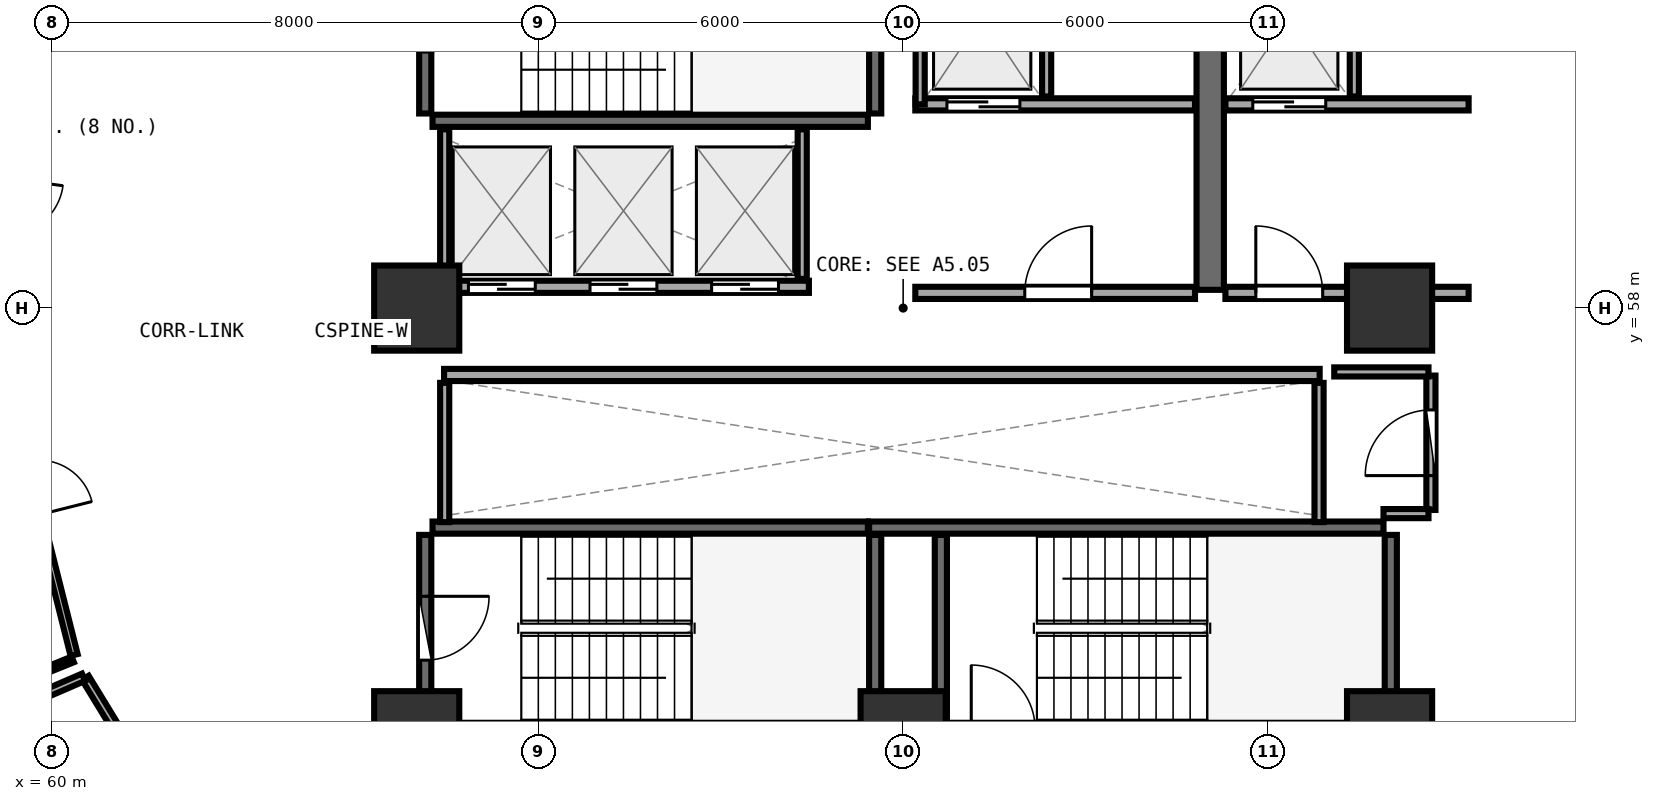
"""IFC4 building model, lengths in metres.
Left out: names, types, materials, properties, quantities, classifications, styles, units other than length and angle.
Written with IfcOpenShell. Run it as: python <this file> out.ifc"""

import sys

from ifc_helpers import new_model, si_unit, direction, frame, frame_2d, origin, origin_2d, place, context, subcontext, project, spatial, rectangle, extrude, element, fill, save


model = new_model("IFC4")
c1 = context("Model", 3, precision=1e-05, world=origin(), true_north=direction((0.0, 1.0)))
c2 = subcontext(c1, "Body", "Model", "MODEL_VIEW")
j1 = project(units=[si_unit("LENGTHUNIT", "METRE"), si_unit("PLANEANGLEUNIT", "RADIAN")], contexts=[c1])
p1 = place(None, origin())
s1 = spatial("IfcSite", under=j1, at=p1, CompositionType="ELEMENT")
p2 = place(p1, origin())
s2 = spatial("IfcBuilding", under=s1, at=p2, CompositionType="ELEMENT")
p3 = place(p2, frame((0.0, 0.0, 22.5)))
s3 = spatial("IfcBuildingStorey", under=s2, at=p3, CompositionType="ELEMENT", Elevation=22.5)
for number, where, z_axis, x_axis in (
    (1, (66.0, 51.0, 0.0), (0.0, 0.0, 1.0), (1.0, 0.0, 0.0)),
    (2, (74.0, 51.0, 0.0), (0.0, 0.0, 1.0), (1.0, 0.0, 0.0)),
    (3, (82.0, 51.0, 0.0), (0.0, 0.0, 1.0), (1.0, 0.0, 0.0)),
    (4, (82.0, 58.0, 0.0), (0.0, 0.0, 1.0), (1.0, 0.0, 0.0)),
    (5, (66.0, 58.0, 0.0), (0.0, 0.0, 1.0), (1.0, 0.0, 0.0)),
):
    element("IfcColumn", number, at=place(p3, frame(where, z_axis=z_axis, x_axis=x_axis)), inside=s3, PredefinedType="PILASTER", context=c2, shape_type="SweptSolid", body=[
        extrude(rectangle(XDim=1.4, YDim=1.4, at=origin_2d()), origin(), (0.0, 0.0, 1.0), 3.75),
    ])
p4 = place(p3, frame((66.26, 61.08, 0.0), z_axis=(0.0, 0.0, 1.0), x_axis=(1.0, 0.0, 0.0)))
e6 = element("IfcWall", 6, at=p4, inside=s3, PredefinedType="SHEAR", context=c2, shape_type="SweptSolid", body=[
    extrude(rectangle(XDim=7.16, YDim=0.2, at=frame_2d((3.58, 0.0))), origin(), (0.0, 0.0, 1.0), 3.49),
])
p5 = place(p3, frame((73.54, 61.2, 0.0), z_axis=(0.0, 0.0, 1.0), x_axis=(0.0, 1.0, 0.0)))
e7 = element("IfcWall", 7, at=p5, inside=s3, PredefinedType="SHEAR", context=c2, shape_type="SweptSolid", body=[
    extrude(rectangle(XDim=3.07, YDim=0.2, at=frame_2d((1.535, 0.0))), origin(), (0.0, 0.0, 1.0), 3.49),
])
p6 = place(p3, frame((66.14, 64.27, 0.0), z_axis=(0.0, 0.0, 1.0), x_axis=(0.0, -1.0, 0.0)))
e8 = element("IfcWall", 8, at=p6, inside=s3, PredefinedType="SHEAR", context=c2, shape_type="SweptSolid", body=[
    extrude(rectangle(XDim=3.07, YDim=0.2, at=frame_2d((1.535, 0.0))), origin(), (0.0, 0.0, 1.0), 3.49),
])
p7 = place(p6, frame((1.01, 0.0, 0.0)))
e9 = element("IfcOpeningElement", 9, at=p7, cuts=e8, PredefinedType="OPENING", context=c2, shape_type="SweptSolid", body=[
    extrude(rectangle(XDim=1.05, YDim=2.1, at=frame_2d((0.525, 1.05))), frame((0.0, 0.11, 0.0), z_axis=(0.0, -1.0, 0.0), x_axis=(1.0, 0.0, 0.0)), (0.0, 0.0, 1.0), 0.22),
])
p8 = place(p3, frame((82.02, 51.2, 0.0), z_axis=(0.0, 0.0, 1.0), x_axis=(0.0, 1.0, 0.0)))
e10 = element("IfcWall", 10, at=p8, inside=s3, PredefinedType="SHEAR", context=c2, shape_type="SweptSolid", body=[
    extrude(rectangle(XDim=3.07, YDim=0.2, at=frame_2d((1.535, 0.0))), origin(), (0.0, 0.0, 1.0), 3.49),
])
p9 = place(p3, frame((81.9, 54.39, 0.0), z_axis=(0.0, 0.0, 1.0), x_axis=(-1.0, 0.0, 0.0)))
e11 = element("IfcWall", 11, at=p9, inside=s3, PredefinedType="SHEAR", context=c2, shape_type="SweptSolid", body=[
    extrude(rectangle(XDim=8.46, YDim=0.2, at=frame_2d((4.23, 0.0))), origin(), (0.0, 0.0, 1.0), 3.49),
])
for number, where, z_axis, x_axis in (
    (12, (74.62, 54.27, 0.0), (0.0, 0.0, 1.0), (0.0, -1.0, 0.0)),
    (13, (73.54, 51.2, 0.0), (0.0, 0.0, 1.0), (0.0, 1.0, 0.0)),
):
    element("IfcWall", number, at=place(p3, frame(where, z_axis=z_axis, x_axis=x_axis)), inside=s3, PredefinedType="SHEAR", context=c2, shape_type="SweptSolid", body=[
        extrude(rectangle(XDim=3.07, YDim=0.2, at=frame_2d((1.535, 0.0))), origin(), (0.0, 0.0, 1.0), 3.49),
    ])
p10 = place(p3, frame((73.42, 54.39, 0.0), z_axis=(0.0, 0.0, 1.0), x_axis=(-1.0, 0.0, 0.0)))
e14 = element("IfcWall", 14, at=p10, inside=s3, PredefinedType="SHEAR", context=c2, shape_type="SweptSolid", body=[
    extrude(rectangle(XDim=7.16, YDim=0.2, at=frame_2d((3.58, 0.0))), origin(), (0.0, 0.0, 1.0), 3.49),
])
p11 = place(p3, frame((66.14, 54.27, 0.0), z_axis=(0.0, 0.0, 1.0), x_axis=(0.0, -1.0, 0.0)))
e15 = element("IfcWall", 15, at=p11, inside=s3, PredefinedType="SHEAR", context=c2, shape_type="SweptSolid", body=[
    extrude(rectangle(XDim=3.07, YDim=0.2, at=frame_2d((1.535, 0.0))), origin(), (0.0, 0.0, 1.0), 3.49),
])
p12 = place(p11, frame((1.01, 0.0, 0.0)))
e16 = element("IfcOpeningElement", 16, at=p12, cuts=e15, PredefinedType="OPENING", context=c2, shape_type="SweptSolid", body=[
    extrude(rectangle(XDim=1.05, YDim=2.1, at=frame_2d((0.525, 1.05))), frame((0.0, 0.11, 0.0), z_axis=(0.0, -1.0, 0.0), x_axis=(1.0, 0.0, 0.0)), (0.0, 0.0, 1.0), 0.22),
])
p13 = place(p3, frame((79.05, 58.3, 0.0), z_axis=(0.0, 0.0, 1.0), x_axis=(0.0, 1.0, 0.0)))
e17 = element("IfcWall", 17, at=p13, inside=s3, PredefinedType="SHEAR", context=c2, shape_type="SweptSolid", body=[
    extrude(rectangle(XDim=6.3, YDim=0.45, at=frame_2d((3.15, 0.0))), origin(), (0.0, 0.0, 1.0), 3.49),
])
p14 = place(p3, frame((74.2, 61.35, 0.0), z_axis=(0.0, 0.0, 1.0), x_axis=(1.0, 0.0, 0.0)))
e18 = element("IfcWall", 18, at=p14, inside=s3, PredefinedType="SOLIDWALL", context=c2, shape_type="SweptSolid", body=[
    extrude(rectangle(XDim=4.6, YDim=0.2, at=frame_2d((2.3, 0.0))), origin(), (0.0, 0.0, 1.0), 3.48),
])
p15 = place(p14, frame((0.52, 0.0, 0.0)))
e19 = element("IfcOpeningElement", 19, at=p15, cuts=e18, PredefinedType="OPENING", context=c2, shape_type="SweptSolid", body=[
    extrude(rectangle(XDim=1.2, YDim=2.15, at=frame_2d((0.6, 1.075))), frame((0.0, 0.11, 0.0), z_axis=(0.0, -1.0, 0.0), x_axis=(1.0, 0.0, 0.0)), (0.0, 0.0, 1.0), 0.22),
])
p16 = place(p3, frame((74.28, 61.35, 0.0), z_axis=(0.0, 0.0, 1.0), x_axis=(0.0, 1.0, 0.0)))
e20 = element("IfcWall", 20, at=p16, inside=s3, PredefinedType="PARTITIONING", context=c2, shape_type="SweptSolid", body=[
    extrude(rectangle(XDim=2.97, YDim=0.15, at=frame_2d((1.485, 0.0))), origin(), (0.0, 0.0, 1.0), 3.48),
])
p17 = place(p3, frame((76.36, 61.48, 0.0), z_axis=(0.0, 0.0, 1.0), x_axis=(0.0, 1.0, 0.0)))
e21 = element("IfcWall", 21, at=p17, inside=s3, PredefinedType="PARTITIONING", context=c2, shape_type="SweptSolid", body=[
    extrude(rectangle(XDim=2.84, YDim=0.15, at=frame_2d((1.42, 0.0))), origin(), (0.0, 0.0, 1.0), 3.48),
])
p18 = place(p3, frame((79.3, 61.35, 0.0), z_axis=(0.0, 0.0, 1.0), x_axis=(1.0, 0.0, 0.0)))
e22 = element("IfcWall", 22, at=p18, inside=s3, PredefinedType="SOLIDWALL", context=c2, shape_type="SweptSolid", body=[
    extrude(rectangle(XDim=4.0, YDim=0.2, at=frame_2d((2.0, 0.0))), origin(), (0.0, 0.0, 1.0), 2.775),
])
p19 = place(p18, frame((0.45, 0.0, 0.0)))
e23 = element("IfcOpeningElement", 23, at=p19, cuts=e22, PredefinedType="OPENING", context=c2, shape_type="SweptSolid", body=[
    extrude(rectangle(XDim=1.2, YDim=2.15, at=frame_2d((0.6, 1.075))), frame((0.0, 0.11, 0.0), z_axis=(0.0, -1.0, 0.0), x_axis=(1.0, 0.0, 0.0)), (0.0, 0.0, 1.0), 0.22),
])
p20 = place(p3, frame((81.42, 61.48, 0.0), z_axis=(0.0, 0.0, 1.0), x_axis=(0.0, 1.0, 0.0)))
e24 = element("IfcWall", 24, at=p20, inside=s3, PredefinedType="PARTITIONING", context=c2, shape_type="SweptSolid", body=[
    extrude(rectangle(XDim=2.84, YDim=0.15, at=frame_2d((1.42, 0.0))), origin(), (0.0, 0.0, 1.0), 3.48),
])
p21 = place(p3, frame((74.2, 58.25, 0.0), z_axis=(0.0, 0.0, 1.0), x_axis=(1.0, 0.0, 0.0)))
e25 = element("IfcWall", 25, at=p21, inside=s3, PredefinedType="SOLIDWALL", context=c2, shape_type="SweptSolid", body=[
    extrude(rectangle(XDim=4.6, YDim=0.2, at=frame_2d((2.3, 0.0))), origin(), (0.0, 0.0, 1.0), 3.48),
])
p22 = place(p21, frame((1.8, 0.0, 0.0)))
e26 = element("IfcOpeningElement", 26, at=p22, cuts=e25, PredefinedType="OPENING", context=c2, shape_type="SweptSolid", body=[
    extrude(rectangle(XDim=1.1, YDim=2.1, at=frame_2d((0.55, 1.05))), frame((0.0, 0.11, 0.0), z_axis=(0.0, -1.0, 0.0), x_axis=(1.0, 0.0, 0.0)), (0.0, 0.0, 1.0), 0.22),
])
p23 = place(p3, frame((79.3, 58.25, 0.0), z_axis=(0.0, 0.0, 1.0), x_axis=(1.0, 0.0, 0.0)))
e27 = element("IfcWall", 27, at=p23, inside=s3, PredefinedType="SOLIDWALL", context=c2, shape_type="SweptSolid", body=[
    extrude(rectangle(XDim=4.0, YDim=0.2, at=frame_2d((2.0, 0.0))), origin(), (0.0, 0.0, 1.0), 2.775),
])
p24 = place(p23, frame((0.5, 0.0, 0.0)))
e28 = element("IfcOpeningElement", 28, at=p24, cuts=e27, PredefinedType="OPENING", context=c2, shape_type="SweptSolid", body=[
    extrude(rectangle(XDim=1.1, YDim=2.1, at=frame_2d((0.55, 1.05))), frame((0.0, 0.11, 0.0), z_axis=(0.0, -1.0, 0.0), x_axis=(1.0, 0.0, 0.0)), (0.0, 0.0, 1.0), 0.22),
])
p25 = place(p3, frame((66.45, 58.35, 0.0), z_axis=(0.0, 0.0, 1.0), x_axis=(1.0, 0.0, 0.0)))
e29 = element("IfcWall", 29, at=p25, inside=s3, PredefinedType="SOLIDWALL", context=c2, shape_type="SweptSolid", body=[
    extrude(rectangle(XDim=6.0, YDim=0.2, at=frame_2d((3.0, 0.0))), origin(), (0.0, 0.0, 1.0), 3.48),
])
p26 = place(p25, frame((0.4, 0.0, 0.0)))
e30 = element("IfcOpeningElement", 30, at=p26, cuts=e29, PredefinedType="OPENING", context=c2, shape_type="SweptSolid", body=[
    extrude(rectangle(XDim=1.1, YDim=2.1, at=frame_2d((0.55, 1.05))), frame((0.0, 0.11, 0.0), z_axis=(0.0, -1.0, 0.0), x_axis=(1.0, 0.0, 0.0)), (0.0, 0.0, 1.0), 0.22),
])
p27 = place(p25, frame((2.4, 0.0, 0.0)))
e31 = element("IfcOpeningElement", 31, at=p27, cuts=e29, PredefinedType="OPENING", context=c2, shape_type="SweptSolid", body=[
    extrude(rectangle(XDim=1.1, YDim=2.1, at=frame_2d((0.55, 1.05))), frame((0.0, 0.11, 0.0), z_axis=(0.0, -1.0, 0.0), x_axis=(1.0, 0.0, 0.0)), (0.0, 0.0, 1.0), 0.22),
])
p28 = place(p25, frame((4.4, 0.0, 0.0)))
e32 = element("IfcOpeningElement", 32, at=p28, cuts=e29, PredefinedType="OPENING", context=c2, shape_type="SweptSolid", body=[
    extrude(rectangle(XDim=1.1, YDim=2.1, at=frame_2d((0.55, 1.05))), frame((0.0, 0.11, 0.0), z_axis=(0.0, -1.0, 0.0), x_axis=(1.0, 0.0, 0.0)), (0.0, 0.0, 1.0), 0.22),
])
for number, where, z_axis, x_axis in (
    (33, (66.46, 58.48, 0.0), (0.0, 0.0, 1.0), (0.0, 1.0, 0.0)),
    (34, (72.34, 58.48, 0.0), (0.0, 0.0, 1.0), (0.0, 1.0, 0.0)),
):
    element("IfcWall", number, at=place(p3, frame(where, z_axis=z_axis, x_axis=x_axis)), inside=s3, PredefinedType="PARTITIONING", context=c2, shape_type="SweptSolid", body=[
        extrude(rectangle(XDim=2.46, YDim=0.15, at=frame_2d((1.23, 0.0))), origin(), (0.0, 0.0, 1.0), 3.48),
    ])
p29 = place(p3, frame((66.45, 56.9, 0.0), z_axis=(0.0, 0.0, 1.0), x_axis=(1.0, 0.0, 0.0)))
e35 = element("IfcWall", 35, at=p29, inside=s3, PredefinedType="SOLIDWALL", context=c2, shape_type="SweptSolid", body=[
    extrude(rectangle(XDim=14.4, YDim=0.2, at=frame_2d((7.2, 0.0))), origin(), (0.0, 0.0, 1.0), 3.48),
])
for number, where, z_axis, x_axis in (
    (36, (66.46, 54.48, 0.0), (0.0, 0.0, 1.0), (0.0, 1.0, 0.0)),
    (37, (80.84, 54.48, 0.0), (0.0, 0.0, 1.0), (0.0, 1.0, 0.0)),
):
    element("IfcWall", number, at=place(p3, frame(where, z_axis=z_axis, x_axis=x_axis)), inside=s3, PredefinedType="PARTITIONING", context=c2, shape_type="SweptSolid", body=[
        extrude(rectangle(XDim=2.29, YDim=0.15, at=frame_2d((1.145, 0.0))), origin(), (0.0, 0.0, 1.0), 3.48),
    ])
p30 = place(p3, frame((82.68, 54.68, 0.0), z_axis=(0.0, 0.0, 1.0), x_axis=(0.0, 1.0, 0.0)))
e38 = element("IfcWall", 38, at=p30, inside=s3, PredefinedType="PARTITIONING", context=c2, shape_type="SweptSolid", body=[
    extrude(rectangle(XDim=2.21, YDim=0.15, at=frame_2d((1.105, 0.0))), origin(), (0.0, 0.0, 1.0), 3.48),
])
p31 = place(p30, frame((0.565, 0.0, 0.0)))
e39 = element("IfcOpeningElement", 39, at=p31, cuts=e38, PredefinedType="OPENING", context=c2, shape_type="SweptSolid", body=[
    extrude(rectangle(XDim=1.08, YDim=2.1, at=frame_2d((0.54, 1.05))), frame((0.0, 0.085, 0.0), z_axis=(0.0, -1.0, 0.0), x_axis=(1.0, 0.0, 0.0)), (0.0, 0.0, 1.0), 0.17),
])
p32 = place(p3, frame((58.986, 57.775, 0.0), z_axis=(0.0, 0.0, 1.0), x_axis=(0.244192294026, -0.969726829338, 0.0)))
e40 = element("IfcWall", 40, at=p32, inside=s3, PredefinedType="PARTITIONING", context=c2, shape_type="SweptSolid", body=[
    extrude(rectangle(XDim=5.651, YDim=0.12, at=frame_2d((2.825, 0.0))), origin(), (0.0, 0.0, 1.0), 3.48),
])
p33 = place(p32, frame((2.375, 0.0, 0.0)))
e41 = element("IfcOpeningElement", 41, at=p33, cuts=e40, PredefinedType="OPENING", context=c2, shape_type="SweptSolid", body=[
    extrude(rectangle(XDim=0.9, YDim=2.08, at=frame_2d((0.45, 1.04))), frame((0.0, 0.07, 0.0), z_axis=(0.0, -1.0, 0.0), x_axis=(1.0, 0.0, 0.0)), (0.0, 0.0, 1.0), 0.14),
])
p34 = place(p3, frame((81.9, 54.62, 0.0), z_axis=(0.0, 0.0, 1.0), x_axis=(1.0, 0.0, 0.0)))
e42 = element("IfcWall", 42, at=p34, inside=s3, PredefinedType="PARTITIONING", context=c2, shape_type="SweptSolid", body=[
    extrude(rectangle(XDim=0.74, YDim=0.15, at=frame_2d((0.37, 0.0))), origin(), (0.0, 0.0, 1.0), 2.775),
])
p35 = place(p3, frame((82.64, 56.95, 0.0), z_axis=(0.0, 0.0, 1.0), x_axis=(-1.0, 0.0, 0.0)))
e43 = element("IfcWall", 43, at=p35, inside=s3, PredefinedType="PARTITIONING", context=c2, shape_type="SweptSolid", body=[
    extrude(rectangle(XDim=1.55, YDim=0.15, at=frame_2d((0.775, 0.0))), origin(), (0.0, 0.0, 1.0), 2.775),
])
p36 = place(p3, frame((60.343, 52.222, 0.0), z_axis=(0.0, 0.0, 1.0), x_axis=(-0.926333713065, -0.376703931542, 0.0)))
e44 = element("IfcWall", 44, at=p36, inside=s3, PredefinedType="PARTITIONING", context=c2, shape_type="SweptSolid", body=[
    extrude(rectangle(XDim=12.099, YDim=0.1, at=frame_2d((6.05, 0.0))), origin(), (0.0, 0.0, 1.0), 2.875),
])
p37 = place(p3, frame((60.549, 51.92, 0.0), z_axis=(0.0, 0.0, 1.0), x_axis=(0.52146609248, -0.853272004928, 0.0)))
e45 = element("IfcWall", 45, at=p37, inside=s3, PredefinedType="PLUMBINGWALL", context=c2, shape_type="SweptSolid", body=[
    extrude(rectangle(XDim=1.228, YDim=0.13, at=frame_2d((0.614, 0.0))), origin(), (0.0, 0.0, 1.0), 3.48),
])
p38 = place(p3, frame((55.91, 49.935, 0.0), z_axis=(0.0, 0.0, 1.0), x_axis=(0.917797204715, 0.397049481826, 0.0)))
e46 = element("IfcWall", 46, at=p38, inside=s3, PredefinedType="PLUMBINGWALL", context=c2, shape_type="SweptSolid", body=[
    extrude(rectangle(XDim=5.023, YDim=0.13, at=frame_2d((2.511, 0.0))), origin(), (0.0, 0.0, 1.0), 2.875),
])
p39 = place(p12, origin())
e47 = element("IfcDoor", 47, at=p39, inside=s3, OperationType="SINGLE_SWING_LEFT", PredefinedType="DOOR", context=c2, shape_type="SweptSolid", body=[
    extrude(rectangle(XDim=1.05, YDim=2.1, at=frame_2d((0.525, 1.05))), frame((0.0, 0.025, 0.0), z_axis=(0.0, -1.0, 0.0), x_axis=(1.0, 0.0, 0.0)), (0.0, 0.0, 1.0), 0.05),
])
fill(e16, e47)
p40 = place(p15, origin())
e48 = element("IfcDoor", 48, at=p40, inside=s3, OperationType="DOUBLE_DOOR_SLIDING", PredefinedType="DOOR", context=c2, shape_type="SweptSolid", body=[
    extrude(rectangle(XDim=1.2, YDim=2.15, at=frame_2d((0.6, 1.075))), frame((0.0, 0.025, 0.0), z_axis=(0.0, -1.0, 0.0), x_axis=(1.0, 0.0, 0.0)), (0.0, 0.0, 1.0), 0.05),
])
fill(e19, e48)
p41 = place(p19, origin())
e49 = element("IfcDoor", 49, at=p41, inside=s3, OperationType="DOUBLE_DOOR_SLIDING", PredefinedType="DOOR", context=c2, shape_type="SweptSolid", body=[
    extrude(rectangle(XDim=1.2, YDim=2.15, at=frame_2d((0.6, 1.075))), frame((0.0, 0.025, 0.0), z_axis=(0.0, -1.0, 0.0), x_axis=(1.0, 0.0, 0.0)), (0.0, 0.0, 1.0), 0.05),
])
fill(e23, e49)
p42 = place(p22, frame((1.1, 0.0, 0.0), z_axis=(0.0, 0.0, 1.0), x_axis=(-1.0, 0.0, 0.0)))
e50 = element("IfcDoor", 50, at=p42, inside=s3, OperationType="SINGLE_SWING_LEFT", PredefinedType="DOOR", context=c2, shape_type="SweptSolid", body=[
    extrude(rectangle(XDim=1.1, YDim=2.1, at=frame_2d((0.55, 1.05))), frame((0.0, 0.025, 0.0), z_axis=(0.0, -1.0, 0.0), x_axis=(1.0, 0.0, 0.0)), (0.0, 0.0, 1.0), 0.05),
])
fill(e26, e50)
p43 = place(p24, frame((1.1, 0.0, 0.0), z_axis=(0.0, 0.0, 1.0), x_axis=(-1.0, 0.0, 0.0)))
e51 = element("IfcDoor", 51, at=p43, inside=s3, OperationType="SINGLE_SWING_RIGHT", PredefinedType="DOOR", context=c2, shape_type="SweptSolid", body=[
    extrude(rectangle(XDim=1.1, YDim=2.1, at=frame_2d((0.55, 1.05))), frame((0.0, 0.025, 0.0), z_axis=(0.0, -1.0, 0.0), x_axis=(1.0, 0.0, 0.0)), (0.0, 0.0, 1.0), 0.05),
])
fill(e28, e51)
p44 = place(p26, origin())
e52 = element("IfcDoor", 52, at=p44, inside=s3, OperationType="DOUBLE_DOOR_SLIDING", PredefinedType="DOOR", context=c2, shape_type="SweptSolid", body=[
    extrude(rectangle(XDim=1.1, YDim=2.1, at=frame_2d((0.55, 1.05))), frame((0.0, 0.025, 0.0), z_axis=(0.0, -1.0, 0.0), x_axis=(1.0, 0.0, 0.0)), (0.0, 0.0, 1.0), 0.05),
])
fill(e30, e52)
p45 = place(p27, origin())
e53 = element("IfcDoor", 53, at=p45, inside=s3, OperationType="DOUBLE_DOOR_SLIDING", PredefinedType="DOOR", context=c2, shape_type="SweptSolid", body=[
    extrude(rectangle(XDim=1.1, YDim=2.1, at=frame_2d((0.55, 1.05))), frame((0.0, 0.025, 0.0), z_axis=(0.0, -1.0, 0.0), x_axis=(1.0, 0.0, 0.0)), (0.0, 0.0, 1.0), 0.05),
])
fill(e31, e53)
p46 = place(p28, origin())
e54 = element("IfcDoor", 54, at=p46, inside=s3, OperationType="DOUBLE_DOOR_SLIDING", PredefinedType="DOOR", context=c2, shape_type="SweptSolid", body=[
    extrude(rectangle(XDim=1.1, YDim=2.1, at=frame_2d((0.55, 1.05))), frame((0.0, 0.025, 0.0), z_axis=(0.0, -1.0, 0.0), x_axis=(1.0, 0.0, 0.0)), (0.0, 0.0, 1.0), 0.05),
])
fill(e32, e54)
p47 = place(p31, origin())
e55 = element("IfcDoor", 55, at=p47, inside=s3, OperationType="SINGLE_SWING_LEFT", PredefinedType="DOOR", context=c2, shape_type="SweptSolid", body=[
    extrude(rectangle(XDim=1.08, YDim=2.1, at=frame_2d((0.54, 1.05))), frame((0.0, 0.025, 0.0), z_axis=(0.0, -1.0, 0.0), x_axis=(1.0, 0.0, 0.0)), (0.0, 0.0, 1.0), 0.05),
])
fill(e39, e55)
save(model, sys.argv[1])
